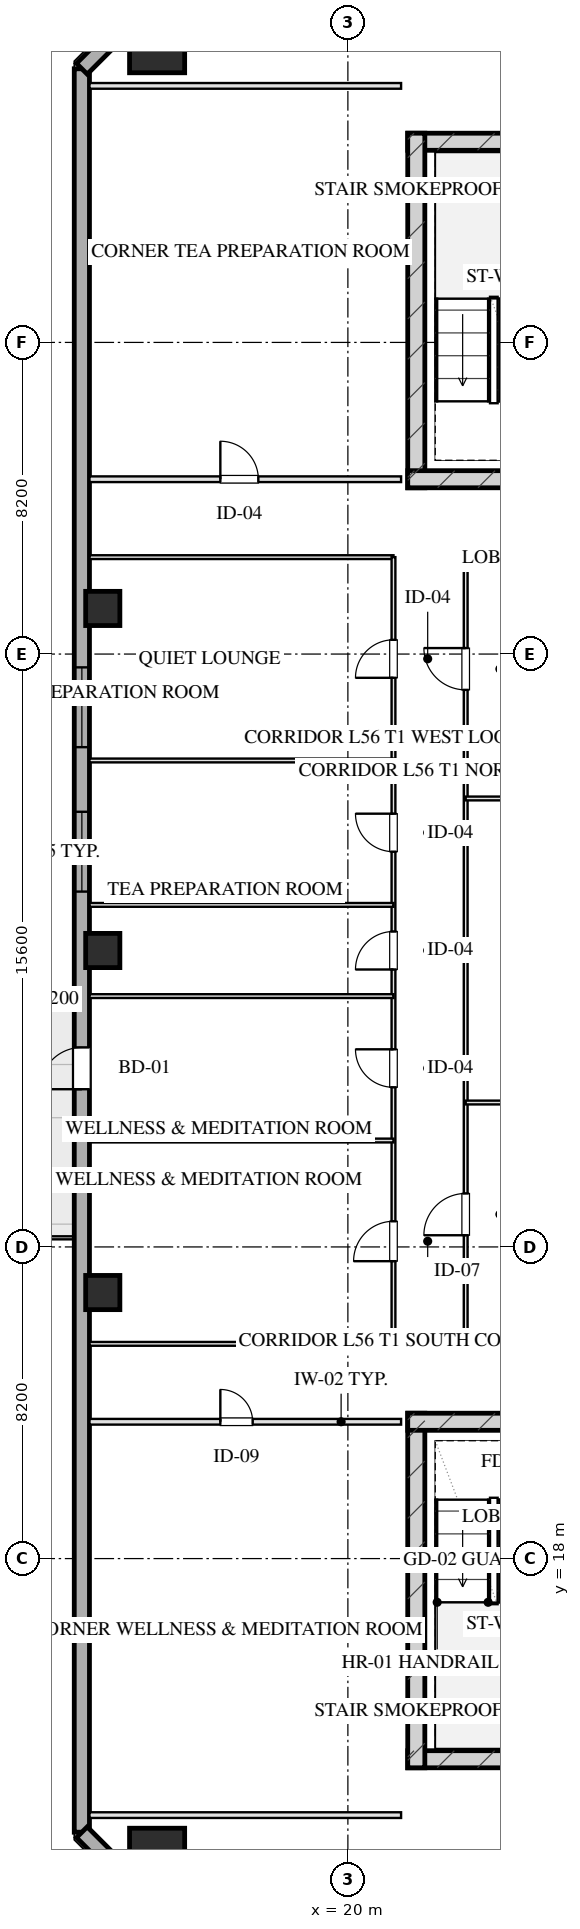
"""IFC4 building model, lengths in metres.
Left out: names, types, materials, properties, quantities, classifications, styles, units other than length and angle.
Written with IfcOpenShell. Run it as: python <this file> out.ifc"""

import sys

from ifc_helpers import new_model, si_unit, direction, frame, frame_2d, origin, origin_2d, place, context, subcontext, project, spatial, rectangle, hollow_rectangle, extrude, element, fill, save


model = new_model("IFC4")
c1 = context("Model", 3, precision=1e-05, world=origin(), true_north=direction((0.0, 1.0)))
c2 = subcontext(c1, "Body", "Model", "MODEL_VIEW")
j1 = project(units=[si_unit("LENGTHUNIT", "METRE"), si_unit("PLANEANGLEUNIT", "RADIAN")], contexts=[c1])
p1 = place(None, origin())
s1 = spatial("IfcSite", under=j1, at=p1, CompositionType="ELEMENT")
p2 = place(p1, origin())
s2 = spatial("IfcBuilding", under=s1, at=p2, CompositionType="ELEMENT")
p3 = place(p2, frame((0.0, 0.0, 209.3)))
s3 = spatial("IfcBuildingStorey", under=s2, at=p3, CompositionType="ELEMENT", Elevation=209.3)
p4 = place(p3, frame((21.575, 12.72, 0.0), z_axis=(0.0, 0.0, 1.0), x_axis=(1.0, 0.0, 0.0)))
e1 = element("IfcWall", 1, at=p4, inside=s3, PredefinedType="SHEAR", context=c2, shape_type="SweptSolid", body=[
    extrude(rectangle(XDim=16.85, YDim=0.45, at=frame_2d((8.425, 0.0))), origin(), (0.0, 0.0, 1.0), 3.45),
])
p5 = place(p3, frame((21.8, 21.825, 0.0), z_axis=(0.0, 0.0, 1.0), x_axis=(0.0, -1.0, 0.0)))
e2 = element("IfcWall", 2, at=p5, inside=s3, PredefinedType="SHEAR", context=c2, shape_type="SweptSolid", body=[
    extrude(rectangle(XDim=9.33, YDim=0.45, at=frame_2d((4.665, 0.0))), origin(), (0.0, 0.0, 1.0), 3.45),
])
p6 = place(p3, frame((21.575, 21.6, 0.0), z_axis=(0.0, 0.0, 1.0), x_axis=(1.0, 0.0, 0.0)))
e3 = element("IfcWall", 3, at=p6, inside=s3, PredefinedType="SHEAR", context=c2, shape_type="SweptSolid", body=[
    extrude(rectangle(XDim=4.145, YDim=0.45, at=frame_2d((2.073, 0.0))), origin(), (0.0, 0.0, 1.0), 3.45),
])
p7 = place(p3, frame((21.575, 55.28, 0.0), z_axis=(0.0, 0.0, 1.0), x_axis=(1.0, 0.0, 0.0)))
e4 = element("IfcWall", 4, at=p7, inside=s3, PredefinedType="SHEAR", context=c2, shape_type="SweptSolid", body=[
    extrude(rectangle(XDim=16.85, YDim=0.45, at=frame_2d((8.425, 0.0))), origin(), (0.0, 0.0, 1.0), 3.45),
])
p8 = place(p3, frame((21.8, 46.175, 0.0), z_axis=(0.0, 0.0, 1.0), x_axis=(0.0, 1.0, 0.0)))
e5 = element("IfcWall", 5, at=p8, inside=s3, PredefinedType="SHEAR", context=c2, shape_type="SweptSolid", body=[
    extrude(rectangle(XDim=9.33, YDim=0.45, at=frame_2d((4.665, 0.0))), origin(), (0.0, 0.0, 1.0), 3.45),
])
p9 = place(p3, frame((21.575, 46.4, 0.0), z_axis=(0.0, 0.0, 1.0), x_axis=(1.0, 0.0, 0.0)))
e6 = element("IfcWall", 6, at=p9, inside=s3, PredefinedType="SHEAR", context=c2, shape_type="SweptSolid", body=[
    extrude(rectangle(XDim=4.145, YDim=0.45, at=frame_2d((2.073, 0.0))), origin(), (0.0, 0.0, 1.0), 3.45),
])
for number, where, z_axis, x_axis in (
    (7, (14.98, 10.18, 0.0), (0.0, 0.0, 1.0), (1.0, 0.0, 0.0)),
    (8, (14.98, 57.82, 0.0), (0.0, 0.0, 1.0), (1.0, 0.0, 0.0)),
):
    element("IfcColumn", number, at=place(p3, frame(where, z_axis=z_axis, x_axis=x_axis)), inside=s3, PredefinedType="COLUMN", context=c2, shape_type="SweptSolid", body=[
        extrude(hollow_rectangle(XDim=1.45, YDim=1.45, WallThickness=0.05, at=origin_2d()), origin(), (0.0, 0.0, 1.0), 3.451),
    ])
for number, where, z_axis, x_axis in (
    (9, (13.55, 25.0, 0.0), (0.0, 0.0, 1.0), (1.0, 0.0, 0.0)),
    (10, (13.55, 34.0, 0.0), (0.0, 0.0, 1.0), (1.0, 0.0, 0.0)),
    (11, (13.55, 43.0, 0.0), (0.0, 0.0, 1.0), (1.0, 0.0, 0.0)),
):
    element("IfcColumn", number, at=place(p3, frame(where, z_axis=z_axis, x_axis=x_axis)), inside=s3, PredefinedType="COLUMN", context=c2, shape_type="SweptSolid", body=[
        extrude(hollow_rectangle(XDim=0.9, YDim=0.9, WallThickness=0.032, at=origin_2d()), origin(), (0.0, 0.0, 1.0), 3.451),
    ])
p10 = place(p3, frame((13.0, 10.8, 0.0), z_axis=(0.0, 0.0, 1.0), x_axis=(0.0, 1.0, 0.0)))
e12 = element("IfcWall", 12, at=p10, inside=s3, PredefinedType="SOLIDWALL", context=c2, shape_type="SweptSolid", body=[
    extrude(rectangle(XDim=46.4, YDim=0.4, at=frame_2d((23.2, 0.0))), origin(), (0.0, 0.0, 1.0), 2.61),
])
p11 = place(p10, frame((24.75, 0.0, 0.75)))
e13 = element("IfcOpeningElement", 13, at=p11, cuts=e12, PredefinedType="OPENING", context=c2, shape_type="SweptSolid", body=[
    extrude(rectangle(XDim=2.1, YDim=1.46, at=frame_2d((1.05, 0.73))), frame((0.0, 0.21, 0.0), z_axis=(0.0, -1.0, 0.0), x_axis=(1.0, 0.0, 0.0)), (0.0, 0.0, 1.0), 0.42),
])
p12 = place(p10, frame((28.55, 0.0, 0.75)))
e14 = element("IfcOpeningElement", 14, at=p12, cuts=e12, PredefinedType="OPENING", context=c2, shape_type="SweptSolid", body=[
    extrude(rectangle(XDim=2.1, YDim=1.46, at=frame_2d((1.05, 0.73))), frame((0.0, 0.21, 0.0), z_axis=(0.0, -1.0, 0.0), x_axis=(1.0, 0.0, 0.0)), (0.0, 0.0, 1.0), 0.42),
])
p13 = place(p10, frame((19.55, 0.0, 0.0)))
e15 = element("IfcOpeningElement", 15, at=p13, cuts=e12, PredefinedType="OPENING", context=c2, shape_type="SweptSolid", body=[
    extrude(rectangle(XDim=1.1, YDim=2.15, at=frame_2d((0.55, 1.075))), frame((0.0, 0.21, 0.0), z_axis=(0.0, -1.0, 0.0), x_axis=(1.0, 0.0, 0.0)), (0.0, 0.0, 1.0), 0.42),
])
for number, where, z_axis, x_axis in (
    (16, (13.0, 57.2, 0.0), (0.0, 0.0, 1.0), (0.707, 0.707, 0.0)),
    (17, (15.6, 8.2, 0.0), (0.0, 0.0, 1.0), (-0.707, 0.707, 0.0)),
):
    element("IfcWall", number, at=place(p3, frame(where, z_axis=z_axis, x_axis=x_axis)), inside=s3, PredefinedType="SOLIDWALL", context=c2, shape_type="SweptSolid", body=[
        extrude(rectangle(XDim=3.677, YDim=0.4, at=frame_2d((1.838, 0.0))), origin(), (0.0, 0.0, 1.0), 2.61),
    ])
p14 = place(p3, frame((13.2, 11.25, 0.0), z_axis=(0.0, 0.0, 1.0), x_axis=(1.0, 0.0, 0.0)))
e18 = element("IfcWall", 18, at=p14, inside=s3, PredefinedType="PARTITIONING", context=c2, shape_type="SweptSolid", body=[
    extrude(rectangle(XDim=8.2, YDim=0.15, at=frame_2d((4.1, 0.0))), origin(), (0.0, 0.0, 1.0), 3.175),
])
p15 = place(p3, frame((13.2, 21.6, 0.0), z_axis=(0.0, 0.0, 1.0), x_axis=(1.0, 0.0, 0.0)))
e19 = element("IfcWall", 19, at=p15, inside=s3, PredefinedType="PARTITIONING", context=c2, shape_type="SweptSolid", body=[
    extrude(rectangle(XDim=8.2, YDim=0.15, at=frame_2d((4.1, 0.0))), origin(), (0.0, 0.0, 1.0), 3.175),
])
p16 = place(p15, frame((3.444, 0.0, 0.0)))
e20 = element("IfcOpeningElement", 20, at=p16, cuts=e19, PredefinedType="OPENING", context=c2, shape_type="SweptSolid", body=[
    extrude(rectangle(XDim=0.85, YDim=2.05, at=frame_2d((0.425, 1.025))), frame((0.0, 0.085, 0.0), z_axis=(0.0, -1.0, 0.0), x_axis=(1.0, 0.0, 0.0)), (0.0, 0.0, 1.0), 0.17),
])
p17 = place(p3, frame((13.2, 56.75, 0.0), z_axis=(0.0, 0.0, 1.0), x_axis=(1.0, 0.0, 0.0)))
e21 = element("IfcWall", 21, at=p17, inside=s3, PredefinedType="PARTITIONING", context=c2, shape_type="SweptSolid", body=[
    extrude(rectangle(XDim=8.2, YDim=0.15, at=frame_2d((4.1, 0.0))), origin(), (0.0, 0.0, 1.0), 3.175),
])
p18 = place(p3, frame((13.2, 46.4, 0.0), z_axis=(0.0, 0.0, 1.0), x_axis=(1.0, 0.0, 0.0)))
e22 = element("IfcWall", 22, at=p18, inside=s3, PredefinedType="PARTITIONING", context=c2, shape_type="SweptSolid", body=[
    extrude(rectangle(XDim=8.2, YDim=0.15, at=frame_2d((4.1, 0.0))), origin(), (0.0, 0.0, 1.0), 3.175),
])
p19 = place(p18, frame((3.444, 0.0, 0.0)))
e23 = element("IfcOpeningElement", 23, at=p19, cuts=e22, PredefinedType="OPENING", context=c2, shape_type="SweptSolid", body=[
    extrude(rectangle(XDim=1.0, YDim=2.05, at=frame_2d((0.5, 1.025))), frame((0.0, 0.085, 0.0), z_axis=(0.0, -1.0, 0.0), x_axis=(1.0, 0.0, 0.0)), (0.0, 0.0, 1.0), 0.17),
])
p20 = place(p3, frame((13.2, 23.65, 0.0), z_axis=(0.0, 0.0, 1.0), x_axis=(1.0, 0.0, 0.0)))
e24 = element("IfcWall", 24, at=p20, inside=s3, PredefinedType="MOVABLE", context=c2, shape_type="SweptSolid", body=[
    extrude(rectangle(XDim=8.0, YDim=0.1, at=frame_2d((4.0, 0.0))), origin(), (0.0, 0.0, 1.0), 3.175),
])
p21 = place(p3, frame((23.1, 23.65, 0.0), z_axis=(0.0, 0.0, 1.0), x_axis=(1.0, 0.0, 0.0)))
e25 = element("IfcWall", 25, at=p21, inside=s3, PredefinedType="MOVABLE", context=c2, shape_type="SweptSolid", body=[
    extrude(rectangle(XDim=13.55, YDim=0.1, at=frame_2d((6.775, 0.0))), origin(), (0.0, 0.0, 1.0), 3.175),
])
p22 = place(p3, frame((13.2, 44.35, 0.0), z_axis=(0.0, 0.0, 1.0), x_axis=(1.0, 0.0, 0.0)))
e26 = element("IfcWall", 26, at=p22, inside=s3, PredefinedType="MOVABLE", context=c2, shape_type="SweptSolid", body=[
    extrude(rectangle(XDim=8.0, YDim=0.1, at=frame_2d((4.0, 0.0))), origin(), (0.0, 0.0, 1.0), 3.175),
])
p23 = place(p3, frame((23.1, 44.35, 0.0), z_axis=(0.0, 0.0, 1.0), x_axis=(1.0, 0.0, 0.0)))
e27 = element("IfcWall", 27, at=p23, inside=s3, PredefinedType="MOVABLE", context=c2, shape_type="SweptSolid", body=[
    extrude(rectangle(XDim=13.55, YDim=0.1, at=frame_2d((6.775, 0.0))), origin(), (0.0, 0.0, 1.0), 3.175),
])
p24 = place(p3, frame((21.2, 23.65, 0.0), z_axis=(0.0, 0.0, 1.0), x_axis=(0.0, 1.0, 0.0)))
e28 = element("IfcWall", 28, at=p24, inside=s3, PredefinedType="MOVABLE", context=c2, shape_type="SweptSolid", body=[
    extrude(rectangle(XDim=20.7, YDim=0.1, at=frame_2d((10.35, 0.0))), origin(), (0.0, 0.0, 1.0), 3.175),
])
p25 = place(p24, frame((2.175, 0.0, 0.0)))
e29 = element("IfcOpeningElement", 29, at=p25, cuts=e28, PredefinedType="OPENING", context=c2, shape_type="SweptSolid", body=[
    extrude(rectangle(XDim=1.05, YDim=2.05, at=frame_2d((0.525, 1.025))), frame((0.0, 0.06, 0.0), z_axis=(0.0, -1.0, 0.0), x_axis=(1.0, 0.0, 0.0)), (0.0, 0.0, 1.0), 0.12),
])
p26 = place(p24, frame((6.75, 0.0, 0.0)))
e30 = element("IfcOpeningElement", 30, at=p26, cuts=e28, PredefinedType="OPENING", context=c2, shape_type="SweptSolid", body=[
    extrude(rectangle(XDim=1.0, YDim=2.05, at=frame_2d((0.5, 1.025))), frame((0.0, 0.06, 0.0), z_axis=(0.0, -1.0, 0.0), x_axis=(1.0, 0.0, 0.0)), (0.0, 0.0, 1.0), 0.12),
])
p27 = place(p24, frame((9.85, 0.0, 0.0)))
e31 = element("IfcOpeningElement", 31, at=p27, cuts=e28, PredefinedType="OPENING", context=c2, shape_type="SweptSolid", body=[
    extrude(rectangle(XDim=1.0, YDim=2.05, at=frame_2d((0.5, 1.025))), frame((0.0, 0.06, 0.0), z_axis=(0.0, -1.0, 0.0), x_axis=(1.0, 0.0, 0.0)), (0.0, 0.0, 1.0), 0.12),
])
p28 = place(p24, frame((12.95, 0.0, 0.0)))
e32 = element("IfcOpeningElement", 32, at=p28, cuts=e28, PredefinedType="OPENING", context=c2, shape_type="SweptSolid", body=[
    extrude(rectangle(XDim=1.0, YDim=2.05, at=frame_2d((0.5, 1.025))), frame((0.0, 0.06, 0.0), z_axis=(0.0, -1.0, 0.0), x_axis=(1.0, 0.0, 0.0)), (0.0, 0.0, 1.0), 0.12),
])
p29 = place(p24, frame((17.525, 0.0, 0.0)))
e33 = element("IfcOpeningElement", 33, at=p29, cuts=e28, PredefinedType="OPENING", context=c2, shape_type="SweptSolid", body=[
    extrude(rectangle(XDim=1.0, YDim=2.05, at=frame_2d((0.5, 1.025))), frame((0.0, 0.06, 0.0), z_axis=(0.0, -1.0, 0.0), x_axis=(1.0, 0.0, 0.0)), (0.0, 0.0, 1.0), 0.12),
])
p30 = place(p3, frame((23.1, 23.65, 0.0), z_axis=(0.0, 0.0, 1.0), x_axis=(0.0, 1.0, 0.0)))
e34 = element("IfcWall", 34, at=p30, inside=s3, PredefinedType="MOVABLE", context=c2, shape_type="SweptSolid", body=[
    extrude(rectangle(XDim=20.7, YDim=0.1, at=frame_2d((10.35, 0.0))), origin(), (0.0, 0.0, 1.0), 3.175),
])
p31 = place(p30, frame((2.857, 0.0, 0.0)))
e35 = element("IfcOpeningElement", 35, at=p31, cuts=e34, PredefinedType="OPENING", context=c2, shape_type="SweptSolid", body=[
    extrude(rectangle(XDim=1.1, YDim=2.05, at=frame_2d((0.55, 1.025))), frame((0.0, 0.06, 0.0), z_axis=(0.0, -1.0, 0.0), x_axis=(1.0, 0.0, 0.0)), (0.0, 0.0, 1.0), 0.12),
])
p32 = place(p30, frame((17.208, 0.0, 0.0)))
e36 = element("IfcOpeningElement", 36, at=p32, cuts=e34, PredefinedType="OPENING", context=c2, shape_type="SweptSolid", body=[
    extrude(rectangle(XDim=1.1, YDim=2.05, at=frame_2d((0.55, 1.025))), frame((0.0, 0.06, 0.0), z_axis=(0.0, -1.0, 0.0), x_axis=(1.0, 0.0, 0.0)), (0.0, 0.0, 1.0), 0.12),
])
for number, where, z_axis, x_axis in (
    (37, (23.1, 30.0, 0.0), (0.0, 0.0, 1.0), (1.0, 0.0, 0.0)),
    (38, (23.1, 38.0, 0.0), (0.0, 0.0, 1.0), (1.0, 0.0, 0.0)),
):
    element("IfcWall", number, at=place(p3, frame(where, z_axis=z_axis, x_axis=x_axis)), inside=s3, PredefinedType="MOVABLE", context=c2, shape_type="SweptSolid", body=[
        extrude(rectangle(XDim=13.55, YDim=0.1, at=frame_2d((6.775, 0.0))), origin(), (0.0, 0.0, 1.0), 3.175),
    ])
for number, where, z_axis, x_axis in (
    (39, (13.2, 29.0, 0.0), (0.0, 0.0, 1.0), (1.0, 0.0, 0.0)),
    (40, (13.2, 32.8, 0.0), (0.0, 0.0, 1.0), (1.0, 0.0, 0.0)),
    (41, (13.2, 35.2, 0.0), (0.0, 0.0, 1.0), (1.0, 0.0, 0.0)),
    (42, (13.2, 39.0, 0.0), (0.0, 0.0, 1.0), (1.0, 0.0, 0.0)),
):
    element("IfcWall", number, at=place(p3, frame(where, z_axis=z_axis, x_axis=x_axis)), inside=s3, PredefinedType="MOVABLE", context=c2, shape_type="SweptSolid", body=[
        extrude(rectangle(XDim=8.0, YDim=0.1, at=frame_2d((4.0, 0.0))), origin(), (0.0, 0.0, 1.0), 3.175),
    ])
p33 = place(p11, origin())
e43 = element("IfcWindow", 43, at=p33, inside=s3, PartitioningType="TRIPLE_PANEL_VERTICAL", PredefinedType="WINDOW", context=c2, shape_type="SweptSolid", body=[
    extrude(rectangle(XDim=2.1, YDim=1.46, at=frame_2d((1.05, 0.73))), frame((0.0, 0.03, 0.0), z_axis=(0.0, -1.0, 0.0), x_axis=(1.0, 0.0, 0.0)), (0.0, 0.0, 1.0), 0.06),
])
fill(e13, e43)
p34 = place(p12, origin())
e44 = element("IfcWindow", 44, at=p34, inside=s3, PartitioningType="TRIPLE_PANEL_VERTICAL", PredefinedType="WINDOW", context=c2, shape_type="SweptSolid", body=[
    extrude(rectangle(XDim=2.1, YDim=1.46, at=frame_2d((1.05, 0.73))), frame((0.0, 0.03, 0.0), z_axis=(0.0, -1.0, 0.0), x_axis=(1.0, 0.0, 0.0)), (0.0, 0.0, 1.0), 0.06),
])
fill(e14, e44)
p35 = place(p13, origin())
e45 = element("IfcDoor", 45, at=p35, inside=s3, OperationType="SINGLE_SWING_LEFT", PredefinedType="DOOR", context=c2, shape_type="SweptSolid", body=[
    extrude(rectangle(XDim=1.1, YDim=2.15, at=frame_2d((0.55, 1.075))), frame((0.0, 0.025, 0.0), z_axis=(0.0, -1.0, 0.0), x_axis=(1.0, 0.0, 0.0)), (0.0, 0.0, 1.0), 0.05),
])
fill(e15, e45)
p36 = place(p16, origin())
e46 = element("IfcDoor", 46, at=p36, inside=s3, OperationType="SINGLE_SWING_LEFT", PredefinedType="DOOR", context=c2, shape_type="SweptSolid", body=[
    extrude(rectangle(XDim=0.85, YDim=2.05, at=frame_2d((0.425, 1.025))), frame((0.0, 0.025, 0.0), z_axis=(0.0, -1.0, 0.0), x_axis=(1.0, 0.0, 0.0)), (0.0, 0.0, 1.0), 0.05),
])
fill(e20, e46)
p37 = place(p19, origin())
e47 = element("IfcDoor", 47, at=p37, inside=s3, OperationType="SINGLE_SWING_LEFT", PredefinedType="DOOR", context=c2, shape_type="SweptSolid", body=[
    extrude(rectangle(XDim=1.0, YDim=2.05, at=frame_2d((0.5, 1.025))), frame((0.0, 0.025, 0.0), z_axis=(0.0, -1.0, 0.0), x_axis=(1.0, 0.0, 0.0)), (0.0, 0.0, 1.0), 0.05),
])
fill(e23, e47)
p38 = place(p25, origin())
e48 = element("IfcDoor", 48, at=p38, inside=s3, OperationType="SINGLE_SWING_LEFT", PredefinedType="DOOR", context=c2, shape_type="SweptSolid", body=[
    extrude(rectangle(XDim=1.05, YDim=2.05, at=frame_2d((0.525, 1.025))), frame((0.0, 0.025, 0.0), z_axis=(0.0, -1.0, 0.0), x_axis=(1.0, 0.0, 0.0)), (0.0, 0.0, 1.0), 0.05),
])
fill(e29, e48)
p39 = place(p26, origin())
e49 = element("IfcDoor", 49, at=p39, inside=s3, OperationType="SINGLE_SWING_RIGHT", PredefinedType="DOOR", context=c2, shape_type="SweptSolid", body=[
    extrude(rectangle(XDim=1.0, YDim=2.05, at=frame_2d((0.5, 1.025))), frame((0.0, 0.025, 0.0), z_axis=(0.0, -1.0, 0.0), x_axis=(1.0, 0.0, 0.0)), (0.0, 0.0, 1.0), 0.05),
])
fill(e30, e49)
p40 = place(p27, origin())
e50 = element("IfcDoor", 50, at=p40, inside=s3, OperationType="SINGLE_SWING_LEFT", PredefinedType="DOOR", context=c2, shape_type="SweptSolid", body=[
    extrude(rectangle(XDim=1.0, YDim=2.05, at=frame_2d((0.5, 1.025))), frame((0.0, 0.025, 0.0), z_axis=(0.0, -1.0, 0.0), x_axis=(1.0, 0.0, 0.0)), (0.0, 0.0, 1.0), 0.05),
])
fill(e31, e50)
p41 = place(p28, origin())
e51 = element("IfcDoor", 51, at=p41, inside=s3, OperationType="SINGLE_SWING_RIGHT", PredefinedType="DOOR", context=c2, shape_type="SweptSolid", body=[
    extrude(rectangle(XDim=1.0, YDim=2.05, at=frame_2d((0.5, 1.025))), frame((0.0, 0.025, 0.0), z_axis=(0.0, -1.0, 0.0), x_axis=(1.0, 0.0, 0.0)), (0.0, 0.0, 1.0), 0.05),
])
fill(e32, e51)
p42 = place(p29, origin())
e52 = element("IfcDoor", 52, at=p42, inside=s3, OperationType="SINGLE_SWING_LEFT", PredefinedType="DOOR", context=c2, shape_type="SweptSolid", body=[
    extrude(rectangle(XDim=1.0, YDim=2.05, at=frame_2d((0.5, 1.025))), frame((0.0, 0.025, 0.0), z_axis=(0.0, -1.0, 0.0), x_axis=(1.0, 0.0, 0.0)), (0.0, 0.0, 1.0), 0.05),
])
fill(e33, e52)
p43 = place(p31, origin())
e53 = element("IfcDoor", 53, at=p43, inside=s3, OperationType="SINGLE_SWING_LEFT", PredefinedType="DOOR", context=c2, shape_type="SweptSolid", body=[
    extrude(rectangle(XDim=1.1, YDim=2.05, at=frame_2d((0.55, 1.025))), frame((0.0, 0.025, 0.0), z_axis=(0.0, -1.0, 0.0), x_axis=(1.0, 0.0, 0.0)), (0.0, 0.0, 1.0), 0.05),
])
fill(e35, e53)
p44 = place(p32, origin())
e54 = element("IfcDoor", 54, at=p44, inside=s3, OperationType="SINGLE_SWING_RIGHT", PredefinedType="DOOR", context=c2, shape_type="SweptSolid", body=[
    extrude(rectangle(XDim=1.1, YDim=2.05, at=frame_2d((0.55, 1.025))), frame((0.0, 0.025, 0.0), z_axis=(0.0, -1.0, 0.0), x_axis=(1.0, 0.0, 0.0)), (0.0, 0.0, 1.0), 0.05),
])
fill(e36, e54)
save(model, sys.argv[1])
